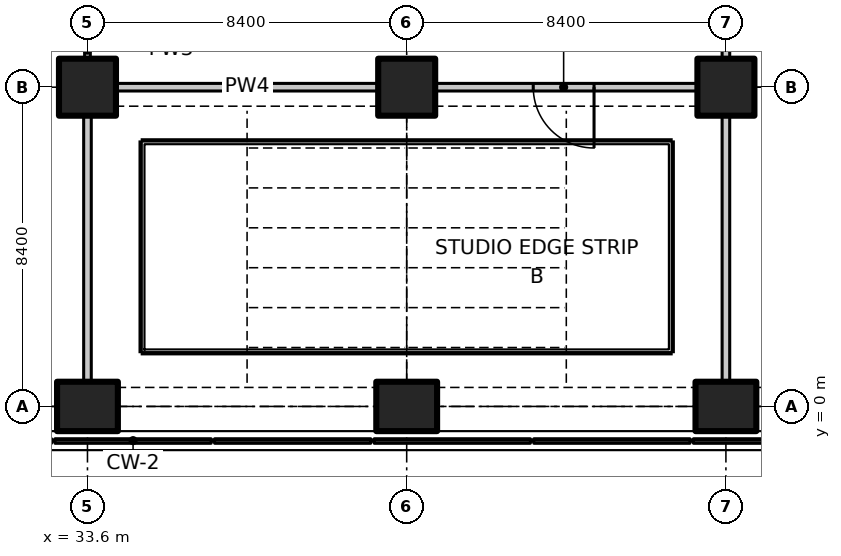
"""IFC4 building model, lengths in metres.
Left out: names, types, materials, properties, quantities, classifications, styles, units other than length and angle.
Written with IfcOpenShell. Run it as: python <this file> out.ifc"""

import sys

from ifc_helpers import new_model, si_unit, direction, frame, frame_2d, origin, origin_2d, place, context, subcontext, project, spatial, polyline, rectangle, outline, extrude, element, fill, save


model = new_model("IFC4")
c1 = context("Model", 3, precision=1e-05, world=origin(), true_north=direction((0.0, 1.0)))
c2 = subcontext(c1, "Body", "Model", "MODEL_VIEW")
j1 = project(units=[si_unit("LENGTHUNIT", "METRE"), si_unit("PLANEANGLEUNIT", "RADIAN")], contexts=[c1])
p1 = place(None, origin())
s1 = spatial("IfcSite", under=j1, at=p1, CompositionType="ELEMENT")
p2 = place(p1, origin())
s2 = spatial("IfcBuilding", under=s1, at=p2, CompositionType="ELEMENT")
p3 = place(p2, frame((0.0, 0.0, 20.0)))
s3 = spatial("IfcBuildingStorey", under=s2, at=p3, CompositionType="ELEMENT", Elevation=20.0)
p4 = place(p3, frame((33.6, 0.0, 0.0), z_axis=(0.0, 0.0, 1.0), x_axis=(0.0, 1.0, 0.0)))
e1 = element("IfcColumn", 1, at=p4, inside=s3, PredefinedType="COLUMN", context=c2, shape_type="SweptSolid", body=[
    extrude(rectangle(XDim=1.3, YDim=1.6, at=origin_2d()), origin(), (0.0, 0.0, 1.0), 7.25),
])
p5 = place(p3, frame((33.6, 8.4, 0.0), z_axis=(0.0, 0.0, 1.0), x_axis=(1.0, 0.0, 0.0)))
e2 = element("IfcColumn", 2, at=p5, inside=s3, PredefinedType="COLUMN", context=c2, shape_type="SweptSolid", body=[
    extrude(rectangle(XDim=1.5, YDim=1.5, at=origin_2d()), origin(), (0.0, 0.0, 1.0), 7.25),
])
p6 = place(p3, frame((42.0, 0.0, 0.0), z_axis=(0.0, 0.0, 1.0), x_axis=(0.0, 1.0, 0.0)))
e3 = element("IfcColumn", 3, at=p6, inside=s3, PredefinedType="COLUMN", context=c2, shape_type="SweptSolid", body=[
    extrude(rectangle(XDim=1.3, YDim=1.6, at=origin_2d()), origin(), (0.0, 0.0, 1.0), 7.25),
])
p7 = place(p3, frame((42.0, 8.4, 0.0), z_axis=(0.0, 0.0, 1.0), x_axis=(1.0, 0.0, 0.0)))
e4 = element("IfcColumn", 4, at=p7, inside=s3, PredefinedType="COLUMN", context=c2, shape_type="SweptSolid", body=[
    extrude(rectangle(XDim=1.5, YDim=1.5, at=origin_2d()), origin(), (0.0, 0.0, 1.0), 7.25),
])
p8 = place(p3, frame((50.4, 0.0, 0.0), z_axis=(0.0, 0.0, 1.0), x_axis=(0.0, 1.0, 0.0)))
e5 = element("IfcColumn", 5, at=p8, inside=s3, PredefinedType="COLUMN", context=c2, shape_type="SweptSolid", body=[
    extrude(rectangle(XDim=1.3, YDim=1.6, at=origin_2d()), origin(), (0.0, 0.0, 1.0), 7.25),
])
p9 = place(p3, frame((50.4, 8.4, 0.0), z_axis=(0.0, 0.0, 1.0), x_axis=(1.0, 0.0, 0.0)))
e6 = element("IfcColumn", 6, at=p9, inside=s3, PredefinedType="COLUMN", context=c2, shape_type="SweptSolid", body=[
    extrude(rectangle(XDim=1.5, YDim=1.5, at=origin_2d()), origin(), (0.0, 0.0, 1.0), 7.25),
])
p10 = place(p3, origin())
e7 = element("IfcWall", 7, at=p10, inside=s3, PredefinedType="SOLIDWALL", context=c2, shape_type="SweptSolid", body=[
    extrude(outline(polyline([(36.855, -0.97), (36.855, -0.85), (32.745, -0.85), (32.745, -0.97), (36.855, -0.97)])), origin(), (0.0, 0.0, 1.0), 7.5),
])
p11 = place(p3, origin())
e8 = element("IfcWall", 8, at=p11, inside=s3, PredefinedType="SOLIDWALL", context=c2, shape_type="SweptSolid", body=[
    extrude(outline(polyline([(41.055, -0.97), (41.055, -0.85), (36.945, -0.85), (36.945, -0.97), (41.055, -0.97)])), origin(), (0.0, 0.0, 1.0), 7.5),
])
p12 = place(p3, origin())
e9 = element("IfcWall", 9, at=p12, inside=s3, PredefinedType="SOLIDWALL", context=c2, shape_type="SweptSolid", body=[
    extrude(outline(polyline([(45.255, -0.97), (45.255, -0.85), (41.145, -0.85), (41.145, -0.97), (45.255, -0.97)])), origin(), (0.0, 0.0, 1.0), 7.5),
])
p13 = place(p3, origin())
e10 = element("IfcWall", 10, at=p13, inside=s3, PredefinedType="SOLIDWALL", context=c2, shape_type="SweptSolid", body=[
    extrude(outline(polyline([(49.455, -0.97), (49.455, -0.85), (45.345, -0.85), (45.345, -0.97), (49.455, -0.97)])), origin(), (0.0, 0.0, 1.0), 7.5),
])
p14 = place(p3, origin())
e11 = element("IfcWall", 11, at=p14, inside=s3, PredefinedType="SOLIDWALL", context=c2, shape_type="SweptSolid", body=[
    extrude(outline(polyline([(53.655, -0.97), (53.655, -0.85), (49.545, -0.85), (49.545, -0.97), (53.655, -0.97)])), origin(), (0.0, 0.0, 1.0), 7.5),
])
p15 = place(p3, frame((50.4, 13.0, 0.0), z_axis=(0.0, 0.0, 1.0), x_axis=(0.0, -1.0, 0.0)))
e12 = element("IfcWall", 12, at=p15, inside=s3, PredefinedType="PARTITIONING", context=c2, shape_type="SweptSolid", body=[
    extrude(rectangle(XDim=3.83, YDim=0.2, at=frame_2d((1.915, 0.0))), origin(), (0.0, 0.0, 1.0), 7.23),
])
p16 = place(p15, frame((1.03, 0.0, 0.0)))
e13 = element("IfcOpeningElement", 13, at=p16, cuts=e12, PredefinedType="OPENING", context=c2, shape_type="SweptSolid", body=[
    extrude(rectangle(XDim=1.6, YDim=2.1, at=frame_2d((0.8, 1.05))), frame((0.0, 0.11, 0.0), z_axis=(0.0, -1.0, 0.0), x_axis=(1.0, 0.0, 0.0)), (0.0, 0.0, 1.0), 0.22),
])
p17 = place(p3, frame((49.63, 8.4, 0.0), z_axis=(0.0, 0.0, 1.0), x_axis=(-1.0, 0.0, 0.0)))
e14 = element("IfcWall", 14, at=p17, inside=s3, PredefinedType="PARTITIONING", context=c2, shape_type="SweptSolid", body=[
    extrude(rectangle(XDim=6.86, YDim=0.2, at=frame_2d((3.43, 0.0))), origin(), (0.0, 0.0, 1.0), 7.23),
])
p18 = place(p17, frame((2.7, 0.0, 0.0)))
e15 = element("IfcOpeningElement", 15, at=p18, cuts=e14, PredefinedType="OPENING", context=c2, shape_type="SweptSolid", body=[
    extrude(rectangle(XDim=1.6, YDim=2.1, at=frame_2d((0.8, 1.05))), frame((0.0, 0.11, 0.0), z_axis=(0.0, -1.0, 0.0), x_axis=(1.0, 0.0, 0.0)), (0.0, 0.0, 1.0), 0.22),
])
p19 = place(p3, frame((41.23, 8.4, 0.0), z_axis=(0.0, 0.0, 1.0), x_axis=(-1.0, 0.0, 0.0)))
e16 = element("IfcWall", 16, at=p19, inside=s3, PredefinedType="PARTITIONING", context=c2, shape_type="SweptSolid", body=[
    extrude(rectangle(XDim=6.86, YDim=0.2, at=frame_2d((3.43, 0.0))), origin(), (0.0, 0.0, 1.0), 7.23),
])
p20 = place(p3, frame((33.6, 9.17, 0.0), z_axis=(0.0, 0.0, 1.0), x_axis=(0.0, 1.0, 0.0)))
e17 = element("IfcWall", 17, at=p20, inside=s3, PredefinedType="PARTITIONING", context=c2, shape_type="SweptSolid", body=[
    extrude(rectangle(XDim=0.41, YDim=0.15, at=frame_2d((0.205, 0.0))), origin(), (0.0, 0.0, 1.0), 7.23),
])
for number, where, z_axis, x_axis in (
    (18, (50.4, 0.67, 0.0), (0.0, 0.0, 1.0), (0.0, 1.0, 0.0)),
    (19, (33.6, 0.67, 0.0), (0.0, 0.0, 1.0), (0.0, 1.0, 0.0)),
):
    element("IfcWall", number, at=place(p3, frame(where, z_axis=z_axis, x_axis=x_axis)), inside=s3, PredefinedType="PARTITIONING", context=c2, shape_type="SweptSolid", body=[
        extrude(rectangle(XDim=6.96, YDim=0.2, at=frame_2d((3.48, 0.0))), origin(), (0.0, 0.0, 1.0), 7.23),
    ])
p21 = place(p18, origin())
e20 = element("IfcDoor", 20, at=p21, inside=s3, OperationType="DOUBLE_DOOR_SINGLE_SWING", PredefinedType="DOOR", context=c2, shape_type="SweptSolid", body=[
    extrude(rectangle(XDim=1.6, YDim=2.1, at=frame_2d((0.8, 1.05))), frame((0.0, 0.025, 0.0), z_axis=(0.0, -1.0, 0.0), x_axis=(1.0, 0.0, 0.0)), (0.0, 0.0, 1.0), 0.05),
])
fill(e15, e20)
save(model, sys.argv[1])
